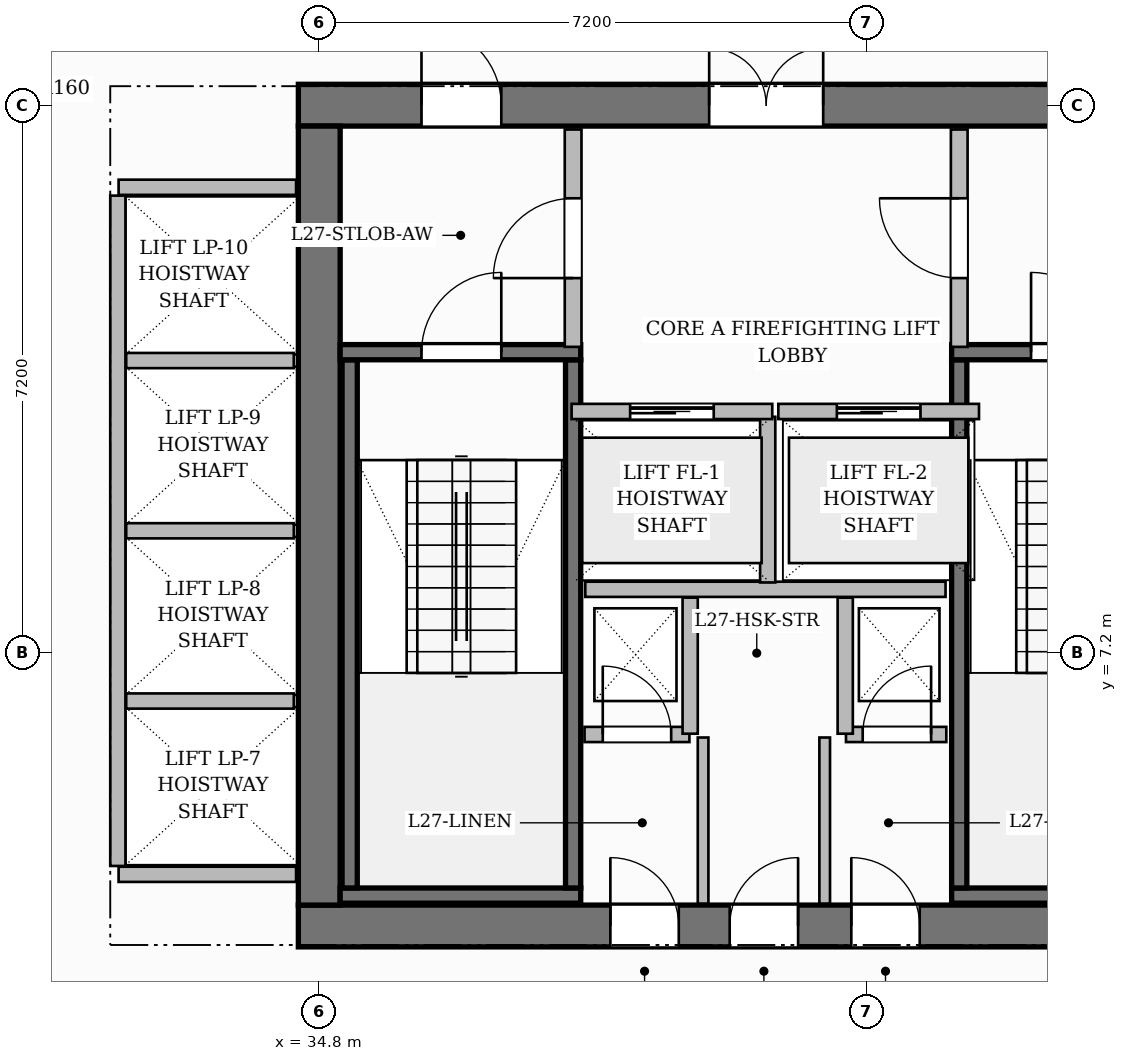
"""IFC4 building model, lengths in metres.
Left out: names, types, materials, properties, quantities, classifications, styles, units other than length and angle.
Written with IfcOpenShell. Run it as: python <this file> out.ifc"""

import sys

from ifc_helpers import new_model, si_unit, direction, frame, frame_2d, origin, place, context, subcontext, project, spatial, rectangle, extrude, source, transform, mapped, element, fill, save


model = new_model("IFC4")
c1 = context("Model", 3, precision=1e-05, world=origin(), true_north=direction((0.0, 1.0)))
c2 = subcontext(c1, "Body", "Model", "MODEL_VIEW")
j1 = project(units=[si_unit("LENGTHUNIT", "METRE"), si_unit("PLANEANGLEUNIT", "RADIAN")], contexts=[c1])
p1 = place(None, origin())
s1 = spatial("IfcSite", under=j1, at=p1, CompositionType="ELEMENT")
p2 = place(p1, origin())
s2 = spatial("IfcBuilding", under=s1, at=p2, CompositionType="ELEMENT")
p3 = place(p2, frame((0.0, 0.0, 111.8)))
s3 = spatial("IfcBuildingStorey", under=s2, at=p3, CompositionType="ELEMENT", Elevation=111.8)
p4 = place(p3, frame((34.525, 3.6, 0.0), z_axis=(0.0, 0.0, 1.0), x_axis=(1.0, 0.0, 0.0)))
e1 = element("IfcWall", 1, at=p4, inside=s3, PredefinedType="SHEAR", context=c2, shape_type="SweptSolid", body=[
    extrude(rectangle(XDim=15.55, YDim=0.55, at=frame_2d((7.775, 0.0))), origin(), (0.0, 0.0, 1.0), 3.7),
])
p5 = place(p4, frame((4.105, 0.0, 0.0)))
e2 = element("IfcOpeningElement", 2, at=p5, cuts=e1, PredefinedType="OPENING", context=c2, shape_type="SweptSolid", body=[
    extrude(rectangle(XDim=0.9, YDim=2.1, at=frame_2d((0.45, 1.05))), frame((0.0, 0.285, 0.0), z_axis=(0.0, -1.0, 0.0), x_axis=(1.0, 0.0, 0.0)), (0.0, 0.0, 1.0), 0.57),
])
p6 = place(p4, frame((5.675, 0.0, 0.0)))
e3 = element("IfcOpeningElement", 3, at=p6, cuts=e1, PredefinedType="OPENING", context=c2, shape_type="SweptSolid", body=[
    extrude(rectangle(XDim=0.9, YDim=2.1, at=frame_2d((0.45, 1.05))), frame((0.0, 0.285, 0.0), z_axis=(0.0, -1.0, 0.0), x_axis=(1.0, 0.0, 0.0)), (0.0, 0.0, 1.0), 0.57),
])
p7 = place(p4, frame((7.275, 0.0, 0.0)))
e4 = element("IfcOpeningElement", 4, at=p7, cuts=e1, PredefinedType="OPENING", context=c2, shape_type="SweptSolid", body=[
    extrude(rectangle(XDim=0.9, YDim=2.1, at=frame_2d((0.45, 1.05))), frame((0.0, 0.285, 0.0), z_axis=(0.0, -1.0, 0.0), x_axis=(1.0, 0.0, 0.0)), (0.0, 0.0, 1.0), 0.57),
])
p8 = place(p3, frame((34.525, 14.4, 0.0), z_axis=(0.0, 0.0, 1.0), x_axis=(1.0, 0.0, 0.0)))
e5 = element("IfcWall", 5, at=p8, inside=s3, PredefinedType="SHEAR", context=c2, shape_type="SweptSolid", body=[
    extrude(rectangle(XDim=15.55, YDim=0.55, at=frame_2d((7.775, 0.0))), origin(), (0.0, 0.0, 1.0), 3.7),
])
p9 = place(p8, frame((5.405, 0.0, 0.0)))
e6 = element("IfcOpeningElement", 6, at=p9, cuts=e5, PredefinedType="OPENING", context=c2, shape_type="SweptSolid", body=[
    extrude(rectangle(XDim=1.5, YDim=2.2, at=frame_2d((0.75, 1.1))), frame((0.0, 0.285, 0.0), z_axis=(0.0, -1.0, 0.0), x_axis=(1.0, 0.0, 0.0)), (0.0, 0.0, 1.0), 0.57),
])
p10 = place(p8, frame((1.62, 0.0, 0.0)))
e7 = element("IfcOpeningElement", 7, at=p10, cuts=e5, PredefinedType="OPENING", context=c2, shape_type="SweptSolid", body=[
    extrude(rectangle(XDim=1.05, YDim=2.15, at=frame_2d((0.525, 1.075))), frame((0.0, 0.285, 0.0), z_axis=(0.0, -1.0, 0.0), x_axis=(1.0, 0.0, 0.0)), (0.0, 0.0, 1.0), 0.57),
])
p11 = place(p8, frame((11.25, 0.0, 0.0)))
e8 = element("IfcOpeningElement", 8, at=p11, cuts=e5, PredefinedType="OPENING", context=c2, shape_type="SweptSolid", body=[
    extrude(rectangle(XDim=1.05, YDim=2.15, at=frame_2d((0.525, 1.075))), frame((0.0, 0.285, 0.0), z_axis=(0.0, -1.0, 0.0), x_axis=(1.0, 0.0, 0.0)), (0.0, 0.0, 1.0), 0.57),
])
p12 = place(p3, frame((34.8, 3.875, 0.0), z_axis=(0.0, 0.0, 1.0), x_axis=(0.0, 1.0, 0.0)))
e9 = element("IfcWall", 9, at=p12, inside=s3, PredefinedType="SHEAR", context=c2, shape_type="SweptSolid", body=[
    extrude(rectangle(XDim=10.25, YDim=0.55, at=frame_2d((5.125, 0.0))), origin(), (0.0, 0.0, 1.0), 3.7),
])
p13 = place(p3, frame((35.075, 4.0, 0.0), z_axis=(0.0, 0.0, 1.0), x_axis=(1.0, 0.0, 0.0)))
e10 = element("IfcWall", 10, at=p13, inside=s3, PredefinedType="SHEAR", context=c2, shape_type="SweptSolid", body=[
    extrude(rectangle(XDim=3.165, YDim=0.2, at=frame_2d((1.583, 0.0))), origin(), (0.0, 0.0, 1.0), 3.7),
])
for number, where, z_axis, x_axis in (
    (11, (35.2, 4.1, 0.0), (0.0, 0.0, 1.0), (0.0, 1.0, 0.0)),
    (12, (38.14, 4.1, 0.0), (0.0, 0.0, 1.0), (0.0, 1.0, 0.0)),
):
    element("IfcWall", number, at=place(p3, frame(where, z_axis=z_axis, x_axis=x_axis)), inside=s3, PredefinedType="SHEAR", context=c2, shape_type="SweptSolid", body=[
        extrude(rectangle(XDim=6.95, YDim=0.2, at=frame_2d((3.475, 0.0))), origin(), (0.0, 0.0, 1.0), 3.7),
    ])
p14 = place(p3, frame((35.075, 11.15, 0.0), z_axis=(0.0, 0.0, 1.0), x_axis=(1.0, 0.0, 0.0)))
e13 = element("IfcWall", 13, at=p14, inside=s3, PredefinedType="SHEAR", context=c2, shape_type="SweptSolid", body=[
    extrude(rectangle(XDim=3.165, YDim=0.2, at=frame_2d((1.583, 0.0))), origin(), (0.0, 0.0, 1.0), 3.7),
])
p15 = place(p14, frame((1.07, 0.0, 0.0)))
e14 = element("IfcOpeningElement", 14, at=p15, cuts=e13, PredefinedType="OPENING", context=c2, shape_type="SweptSolid", body=[
    extrude(rectangle(XDim=1.05, YDim=2.2, at=frame_2d((0.525, 1.1))), frame((0.0, 0.11, 0.0), z_axis=(0.0, -1.0, 0.0), x_axis=(1.0, 0.0, 0.0)), (0.0, 0.0, 1.0), 0.22),
])
p16 = place(p3, frame((43.12, 4.0, 0.0), z_axis=(0.0, 0.0, 1.0), x_axis=(1.0, 0.0, 0.0)))
e15 = element("IfcWall", 15, at=p16, inside=s3, PredefinedType="SHEAR", context=c2, shape_type="SweptSolid", body=[
    extrude(rectangle(XDim=6.405, YDim=0.2, at=frame_2d((3.202, 0.0))), origin(), (0.0, 0.0, 1.0), 3.7),
])
p17 = place(p3, frame((43.22, 4.1, 0.0), z_axis=(0.0, 0.0, 1.0), x_axis=(0.0, 1.0, 0.0)))
e16 = element("IfcWall", 16, at=p17, inside=s3, PredefinedType="SHEAR", context=c2, shape_type="SweptSolid", body=[
    extrude(rectangle(XDim=6.95, YDim=0.2, at=frame_2d((3.475, 0.0))), origin(), (0.0, 0.0, 1.0), 3.7),
])
p18 = place(p3, frame((43.12, 11.15, 0.0), z_axis=(0.0, 0.0, 1.0), x_axis=(1.0, 0.0, 0.0)))
e17 = element("IfcWall", 17, at=p18, inside=s3, PredefinedType="SHEAR", context=c2, shape_type="SweptSolid", body=[
    extrude(rectangle(XDim=6.405, YDim=0.2, at=frame_2d((3.202, 0.0))), origin(), (0.0, 0.0, 1.0), 3.7),
])
p19 = place(p18, frame((1.045, 0.0, 0.0)))
e18 = element("IfcOpeningElement", 18, at=p19, cuts=e17, PredefinedType="OPENING", context=c2, shape_type="SweptSolid", body=[
    extrude(rectangle(XDim=1.05, YDim=2.2, at=frame_2d((0.525, 1.1))), frame((0.0, 0.11, 0.0), z_axis=(0.0, -1.0, 0.0), x_axis=(1.0, 0.0, 0.0)), (0.0, 0.0, 1.0), 0.22),
])
p20 = place(p18, frame((4.125, 0.0, 0.0)))
e19 = element("IfcOpeningElement", 19, at=p20, cuts=e17, PredefinedType="OPENING", context=c2, shape_type="SweptSolid", body=[
    extrude(rectangle(XDim=1.05, YDim=2.2, at=frame_2d((0.525, 1.1))), frame((0.0, 0.11, 0.0), z_axis=(0.0, -1.0, 0.0), x_axis=(1.0, 0.0, 0.0)), (0.0, 0.0, 1.0), 0.22),
])
p21 = place(p3, frame((38.3, 8.03, 0.0), z_axis=(0.0, 0.0, 1.0), x_axis=(1.0, 0.0, 0.0)))
e20 = element("IfcWall", 20, at=p21, inside=s3, PredefinedType="PARTITIONING", context=c2, shape_type="SweptSolid", body=[
    extrude(rectangle(XDim=4.74, YDim=0.2, at=frame_2d((2.37, 0.0))), origin(), (0.0, 0.0, 1.0), 3.45),
])
p22 = place(p3, frame((40.7, 8.12, 0.0), z_axis=(0.0, 0.0, 1.0), x_axis=(0.0, 1.0, 0.0)))
e21 = element("IfcWall", 21, at=p22, inside=s3, PredefinedType="PARTITIONING", context=c2, shape_type="SweptSolid", body=[
    extrude(rectangle(XDim=2.18, YDim=0.2, at=frame_2d((1.09, 0.0))), origin(), (0.0, 0.0, 1.0), 3.45),
])
p23 = place(p3, frame((38.14, 11.22, 0.0), z_axis=(0.0, 0.0, 1.0), x_axis=(0.0, 1.0, 0.0)))
e22 = element("IfcWall", 22, at=p23, inside=s3, PredefinedType="PARTITIONING", context=c2, shape_type="SweptSolid", body=[
    extrude(rectangle(XDim=2.86, YDim=0.22, at=frame_2d((1.43, 0.0))), origin(), (0.0, 0.0, 1.0), 3.45),
])
p24 = place(p23, frame((0.905, 0.0, 0.0)))
e23 = element("IfcOpeningElement", 23, at=p24, cuts=e22, PredefinedType="OPENING", context=c2, shape_type="SweptSolid", body=[
    extrude(rectangle(XDim=1.05, YDim=2.15, at=frame_2d((0.525, 1.075))), frame((0.0, 0.12, 0.0), z_axis=(0.0, -1.0, 0.0), x_axis=(1.0, 0.0, 0.0)), (0.0, 0.0, 1.0), 0.24),
])
p25 = place(p3, frame((43.22, 11.22, 0.0), z_axis=(0.0, 0.0, 1.0), x_axis=(0.0, 1.0, 0.0)))
e24 = element("IfcWall", 24, at=p25, inside=s3, PredefinedType="PARTITIONING", context=c2, shape_type="SweptSolid", body=[
    extrude(rectangle(XDim=2.86, YDim=0.22, at=frame_2d((1.43, 0.0))), origin(), (0.0, 0.0, 1.0), 3.45),
])
p26 = place(p25, frame((0.905, 0.0, 0.0)))
e25 = element("IfcOpeningElement", 25, at=p26, cuts=e24, PredefinedType="OPENING", context=c2, shape_type="SweptSolid", body=[
    extrude(rectangle(XDim=1.05, YDim=2.15, at=frame_2d((0.525, 1.075))), frame((0.0, 0.12, 0.0), z_axis=(0.0, -1.0, 0.0), x_axis=(1.0, 0.0, 0.0)), (0.0, 0.0, 1.0), 0.24),
])
p27 = place(p3, frame((38.29, 6.12, 0.0), z_axis=(0.0, 0.0, 1.0), x_axis=(1.0, 0.0, 0.0)))
e26 = element("IfcWall", 26, at=p27, inside=s3, PredefinedType="PARTITIONING", context=c2, shape_type="SweptSolid", body=[
    extrude(rectangle(XDim=1.38, YDim=0.2, at=frame_2d((0.69, 0.0))), origin(), (0.0, 0.0, 1.0), 3.45),
])
p28 = place(p27, frame((0.24, 0.0, 0.0)))
e27 = element("IfcOpeningElement", 27, at=p28, cuts=e26, PredefinedType="OPENING", context=c2, shape_type="SweptSolid", body=[
    extrude(rectangle(XDim=0.9, YDim=2.1, at=frame_2d((0.45, 1.05))), frame((0.0, 0.11, 0.0), z_axis=(0.0, -1.0, 0.0), x_axis=(1.0, 0.0, 0.0)), (0.0, 0.0, 1.0), 0.22),
])
p29 = place(p3, frame((39.68, 6.13, 0.0), z_axis=(0.0, 0.0, 1.0), x_axis=(0.0, 1.0, 0.0)))
e28 = element("IfcWall", 28, at=p29, inside=s3, PredefinedType="PARTITIONING", context=c2, shape_type="SweptSolid", body=[
    extrude(rectangle(XDim=1.79, YDim=0.2, at=frame_2d((0.895, 0.0))), origin(), (0.0, 0.0, 1.0), 3.45),
])
p30 = place(p3, frame((41.73, 6.12, 0.0), z_axis=(0.0, 0.0, 1.0), x_axis=(1.0, 0.0, 0.0)))
e29 = element("IfcWall", 29, at=p30, inside=s3, PredefinedType="PARTITIONING", context=c2, shape_type="SweptSolid", body=[
    extrude(rectangle(XDim=1.32, YDim=0.2, at=frame_2d((0.66, 0.0))), origin(), (0.0, 0.0, 1.0), 3.45),
])
p31 = place(p30, frame((0.22, 0.0, 0.0)))
e30 = element("IfcOpeningElement", 30, at=p31, cuts=e29, PredefinedType="OPENING", context=c2, shape_type="SweptSolid", body=[
    extrude(rectangle(XDim=0.9, YDim=2.1, at=frame_2d((0.45, 1.05))), frame((0.0, 0.11, 0.0), z_axis=(0.0, -1.0, 0.0), x_axis=(1.0, 0.0, 0.0)), (0.0, 0.0, 1.0), 0.22),
])
p32 = place(p3, frame((41.72, 6.13, 0.0), z_axis=(0.0, 0.0, 1.0), x_axis=(0.0, 1.0, 0.0)))
e31 = element("IfcWall", 31, at=p32, inside=s3, PredefinedType="PARTITIONING", context=c2, shape_type="SweptSolid", body=[
    extrude(rectangle(XDim=1.79, YDim=0.2, at=frame_2d((0.895, 0.0))), origin(), (0.0, 0.0, 1.0), 3.45),
])
for number, where, z_axis, x_axis in (
    (32, (39.85, 3.895, 0.0), (0.0, 0.0, 1.0), (0.0, 1.0, 0.0)),
    (33, (41.45, 3.895, 0.0), (0.0, 0.0, 1.0), (0.0, 1.0, 0.0)),
):
    element("IfcWall", number, at=place(p3, frame(where, z_axis=z_axis, x_axis=x_axis)), inside=s3, PredefinedType="PARTITIONING", context=c2, shape_type="SweptSolid", body=[
        extrude(rectangle(XDim=2.185, YDim=0.14, at=frame_2d((1.093, 0.0))), origin(), (0.0, 0.0, 1.0), 3.45),
    ])
for number, where, z_axis, x_axis in (
    (34, (32.16, 4.28, 0.0), (0.0, 0.0, 1.0), (1.0, 0.0, 0.0)),
    (35, (32.16, 13.32, 0.0), (0.0, 0.0, 1.0), (1.0, 0.0, 0.0)),
):
    element("IfcWall", number, at=place(p3, frame(where, z_axis=z_axis, x_axis=x_axis)), inside=s3, PredefinedType="PARTITIONING", context=c2, shape_type="SweptSolid", body=[
        extrude(rectangle(XDim=2.335, YDim=0.2, at=frame_2d((1.167, 0.0))), origin(), (0.0, 0.0, 1.0), 3.45),
    ])
p33 = place(p3, frame((32.15, 4.39, 0.0), z_axis=(0.0, 0.0, 1.0), x_axis=(0.0, 1.0, 0.0)))
e36 = element("IfcWall", 36, at=p33, inside=s3, PredefinedType="PARTITIONING", context=c2, shape_type="SweptSolid", body=[
    extrude(rectangle(XDim=8.82, YDim=0.2, at=frame_2d((4.41, 0.0))), origin(), (0.0, 0.0, 1.0), 3.45),
])
for number, where, z_axis, x_axis in (
    (37, (32.26, 6.56, 0.0), (0.0, 0.0, 1.0), (1.0, 0.0, 0.0)),
    (38, (32.26, 8.8, 0.0), (0.0, 0.0, 1.0), (1.0, 0.0, 0.0)),
    (39, (32.26, 11.04, 0.0), (0.0, 0.0, 1.0), (1.0, 0.0, 0.0)),
):
    element("IfcWall", number, at=place(p3, frame(where, z_axis=z_axis, x_axis=x_axis)), inside=s3, PredefinedType="PARTITIONING", context=c2, shape_type="SweptSolid", body=[
        extrude(rectangle(XDim=2.205, YDim=0.2, at=frame_2d((1.103, 0.0))), origin(), (0.0, 0.0, 1.0), 3.45),
    ])
p34 = place(p3, frame((38.12, 10.37, 0.0), z_axis=(0.0, 0.0, 1.0), x_axis=(1.0, 0.0, 0.0)))
e40 = element("IfcWall", 40, at=p34, inside=s3, PredefinedType="PARTITIONING", context=c2, shape_type="SweptSolid", body=[
    extrude(rectangle(XDim=2.64, YDim=0.2, at=frame_2d((1.32, 0.0))), origin(), (0.0, 0.0, 1.0), 3.45),
])
p35 = place(p34, frame((0.77, 0.0, 0.0)))
e41 = element("IfcOpeningElement", 41, at=p35, cuts=e40, PredefinedType="OPENING", context=c2, shape_type="SweptSolid", body=[
    extrude(rectangle(XDim=1.1, YDim=2.2, at=frame_2d((0.55, 1.1))), frame((0.0, 0.11, 0.0), z_axis=(0.0, -1.0, 0.0), x_axis=(1.0, 0.0, 0.0)), (0.0, 0.0, 1.0), 0.22),
])
p36 = place(p3, frame((40.84, 10.37, 0.0), z_axis=(0.0, 0.0, 1.0), x_axis=(1.0, 0.0, 0.0)))
e42 = element("IfcWall", 42, at=p36, inside=s3, PredefinedType="PARTITIONING", context=c2, shape_type="SweptSolid", body=[
    extrude(rectangle(XDim=2.64, YDim=0.2, at=frame_2d((1.32, 0.0))), origin(), (0.0, 0.0, 1.0), 3.45),
])
p37 = place(p36, frame((0.77, 0.0, 0.0)))
e43 = element("IfcOpeningElement", 43, at=p37, cuts=e42, PredefinedType="OPENING", context=c2, shape_type="SweptSolid", body=[
    extrude(rectangle(XDim=1.1, YDim=2.2, at=frame_2d((0.55, 1.1))), frame((0.0, 0.11, 0.0), z_axis=(0.0, -1.0, 0.0), x_axis=(1.0, 0.0, 0.0)), (0.0, 0.0, 1.0), 0.22),
])
m1 = source(origin(), c2, "Body", "SweptSolid", [
    extrude(rectangle(XDim=1.05, YDim=2.2, at=frame_2d((0.525, 1.1))), frame((0.0, 0.025, 0.0), z_axis=(0.0, -1.0, 0.0), x_axis=(1.0, 0.0, 0.0)), (0.0, 0.0, 1.0), 0.05),
])
p38 = place(p15, origin())
e44 = element("IfcDoor", 44, at=p38, inside=s3, OperationType="SINGLE_SWING_RIGHT", PredefinedType="DOOR", context=c2, shape_type="MappedRepresentation", body=[
    mapped(m1, transform((0.0, 0.0, 0.0), scale=1.0)),
])
fill(e14, e44)
p39 = place(p19, origin())
e45 = element("IfcDoor", 45, at=p39, inside=s3, OperationType="SINGLE_SWING_LEFT", PredefinedType="DOOR", context=c2, shape_type="MappedRepresentation", body=[
    mapped(m1, transform((0.0, 0.0, 0.0), scale=1.0)),
])
fill(e18, e45)
m2 = source(origin(), c2, "Body", "SweptSolid", [
    extrude(rectangle(XDim=1.05, YDim=2.15, at=frame_2d((0.525, 1.075))), frame((0.0, 0.025, 0.0), z_axis=(0.0, -1.0, 0.0), x_axis=(1.0, 0.0, 0.0)), (0.0, 0.0, 1.0), 0.05),
])
p40 = place(p24, origin())
e46 = element("IfcDoor", 46, at=p40, inside=s3, OperationType="SINGLE_SWING_LEFT", PredefinedType="DOOR", context=c2, shape_type="MappedRepresentation", body=[
    mapped(m2, transform((0.0, 0.0, 0.0), scale=1.0)),
])
fill(e23, e46)
p41 = place(p26, origin())
e47 = element("IfcDoor", 47, at=p41, inside=s3, OperationType="SINGLE_SWING_RIGHT", PredefinedType="DOOR", context=c2, shape_type="MappedRepresentation", body=[
    mapped(m2, transform((0.0, 0.0, 0.0), scale=1.0)),
])
fill(e25, e47)
m3 = source(origin(), c2, "Body", "SweptSolid", [
    extrude(rectangle(XDim=1.5, YDim=2.2, at=frame_2d((0.75, 1.1))), frame((0.0, 0.025, 0.0), z_axis=(0.0, -1.0, 0.0), x_axis=(1.0, 0.0, 0.0)), (0.0, 0.0, 1.0), 0.05),
])
p42 = place(p9, origin())
e48 = element("IfcDoor", 48, at=p42, inside=s3, OperationType="DOUBLE_DOOR_SINGLE_SWING", PredefinedType="DOOR", context=c2, shape_type="MappedRepresentation", body=[
    mapped(m3, transform((0.0, 0.0, 0.0), scale=1.0)),
])
fill(e6, e48)
p43 = place(p10, origin())
e49 = element("IfcDoor", 49, at=p43, inside=s3, OperationType="SINGLE_SWING_LEFT", PredefinedType="DOOR", context=c2, shape_type="MappedRepresentation", body=[
    mapped(m2, transform((0.0, 0.0, 0.0), scale=1.0)),
])
fill(e7, e49)
m4 = source(origin(), c2, "Body", "SweptSolid", [
    extrude(rectangle(XDim=0.9, YDim=2.1, at=frame_2d((0.45, 1.05))), frame((0.0, 0.025, 0.0), z_axis=(0.0, -1.0, 0.0), x_axis=(1.0, 0.0, 0.0)), (0.0, 0.0, 1.0), 0.05),
])
p44 = place(p28, origin())
e50 = element("IfcDoor", 50, at=p44, inside=s3, OperationType="SINGLE_SWING_LEFT", PredefinedType="DOOR", context=c2, shape_type="MappedRepresentation", body=[
    mapped(m4, transform((0.0, 0.0, 0.0), scale=1.0)),
])
fill(e27, e50)
p45 = place(p31, origin())
e51 = element("IfcDoor", 51, at=p45, inside=s3, OperationType="SINGLE_SWING_RIGHT", PredefinedType="DOOR", context=c2, shape_type="MappedRepresentation", body=[
    mapped(m4, transform((0.0, 0.0, 0.0), scale=1.0)),
])
fill(e30, e51)
p46 = place(p5, origin())
e52 = element("IfcDoor", 52, at=p46, inside=s3, OperationType="SINGLE_SWING_LEFT", PredefinedType="DOOR", context=c2, shape_type="MappedRepresentation", body=[
    mapped(m4, transform((0.0, 0.0, 0.0), scale=1.0)),
])
fill(e2, e52)
p47 = place(p6, origin())
e53 = element("IfcDoor", 53, at=p47, inside=s3, OperationType="SINGLE_SWING_RIGHT", PredefinedType="DOOR", context=c2, shape_type="MappedRepresentation", body=[
    mapped(m4, transform((0.0, 0.0, 0.0), scale=1.0)),
])
fill(e3, e53)
p48 = place(p7, origin())
e54 = element("IfcDoor", 54, at=p48, inside=s3, OperationType="SINGLE_SWING_LEFT", PredefinedType="DOOR", context=c2, shape_type="MappedRepresentation", body=[
    mapped(m4, transform((0.0, 0.0, 0.0), scale=1.0)),
])
fill(e4, e54)
m5 = source(origin(), c2, "Body", "SweptSolid", [
    extrude(rectangle(XDim=1.1, YDim=2.2, at=frame_2d((0.55, 1.1))), frame((0.0, 0.025, 0.0), z_axis=(0.0, -1.0, 0.0), x_axis=(1.0, 0.0, 0.0)), (0.0, 0.0, 1.0), 0.05),
])
p49 = place(p35, origin())
e55 = element("IfcDoor", 55, at=p49, inside=s3, OperationType="SLIDING_TO_LEFT", PredefinedType="DOOR", context=c2, shape_type="MappedRepresentation", body=[
    mapped(m5, transform((0.0, 0.0, 0.0), scale=1.0)),
])
fill(e41, e55)
p50 = place(p37, origin())
e56 = element("IfcDoor", 56, at=p50, inside=s3, OperationType="SLIDING_TO_LEFT", PredefinedType="DOOR", context=c2, shape_type="MappedRepresentation", body=[
    mapped(m5, transform((0.0, 0.0, 0.0), scale=1.0)),
])
fill(e43, e56)
save(model, sys.argv[1])
